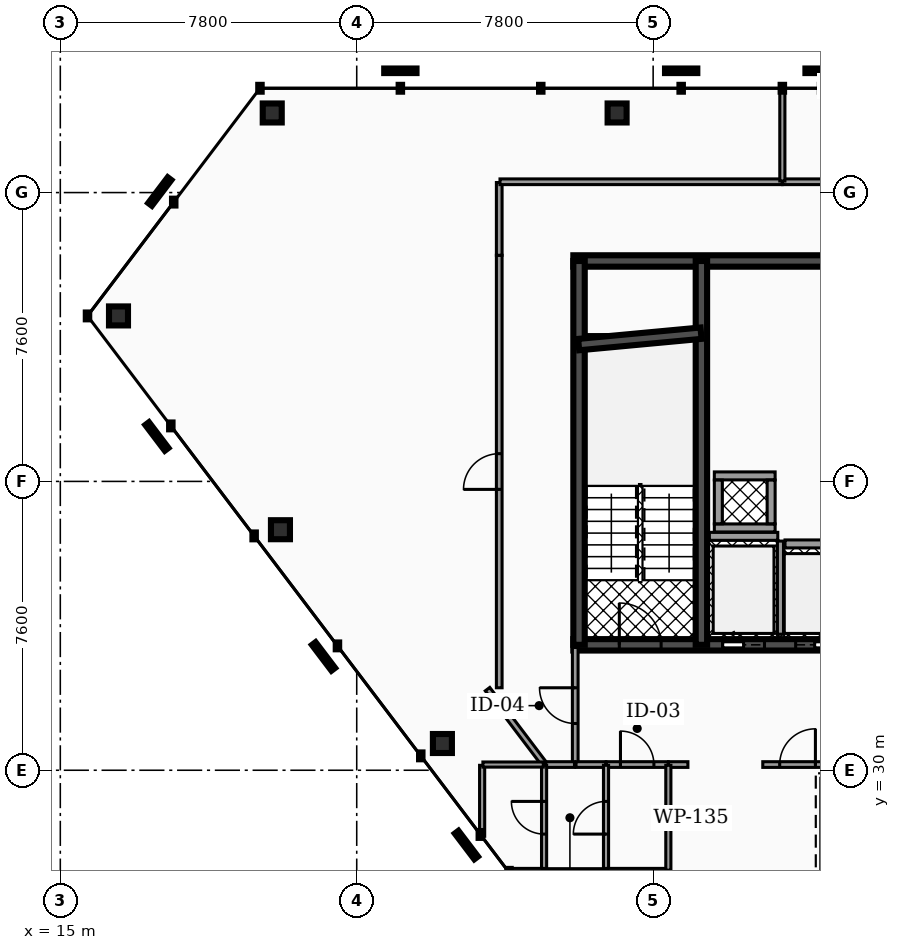
"""IFC4 building model, lengths in metres.
Left out: names, types, materials, properties, quantities, classifications, styles, units other than length and angle.
Written with IfcOpenShell. Run it as: python <this file> out.ifc"""

import sys

from ifc_helpers import new_model, si_unit, direction, frame, frame_2d, origin, origin_2d, place, context, subcontext, project, spatial, rectangle, hollow_rectangle, extrude, element, fill, save


model = new_model("IFC4")
c1 = context("Model", 3, precision=1e-05, world=origin(), true_north=direction((0.0, 1.0)))
c2 = subcontext(c1, "Body", "Model", "MODEL_VIEW")
j1 = project(units=[si_unit("LENGTHUNIT", "METRE"), si_unit("PLANEANGLEUNIT", "RADIAN")], contexts=[c1])
p1 = place(None, origin())
s1 = spatial("IfcSite", under=j1, at=p1, CompositionType="ELEMENT")
p2 = place(p1, origin())
s2 = spatial("IfcBuilding", under=s1, at=p2, CompositionType="ELEMENT")
p3 = place(p2, frame((0.0, 0.0, 249.56)))
s3 = spatial("IfcBuildingStorey", under=s2, at=p3, CompositionType="ELEMENT", Elevation=249.56)
p4 = place(p3, frame((28.5, 43.4, 0.0), z_axis=(0.0, 0.0, 1.0), x_axis=(1.0, 0.0, 0.0)))
e1 = element("IfcWall", 1, at=p4, inside=s3, PredefinedType="SHEAR", context=c2, shape_type="SweptSolid", body=[
    extrude(rectangle(XDim=19.86, YDim=0.3, at=frame_2d((9.93, 0.0))), origin(), (0.0, 0.0, 1.0), 3.05),
])
p5 = place(p3, frame((28.5, 33.3, 0.0), z_axis=(0.0, 0.0, 1.0), x_axis=(1.0, 0.0, 0.0)))
e2 = element("IfcWall", 2, at=p5, inside=s3, PredefinedType="SHEAR", context=c2, shape_type="SweptSolid", body=[
    extrude(rectangle(XDim=19.86, YDim=0.3, at=frame_2d((9.93, 0.0))), origin(), (0.0, 0.0, 1.0), 3.05),
])
p6 = place(p5, frame((3.93, 0.0, 0.0)))
e3 = element("IfcOpeningElement", 3, at=p6, cuts=e2, PredefinedType="OPENING", context=c2, shape_type="SweptSolid", body=[
    extrude(rectangle(XDim=1.1, YDim=2.15, at=frame_2d((0.55, 1.075))), frame((0.0, 0.16, 0.0), z_axis=(0.0, -1.0, 0.0), x_axis=(1.0, 0.0, 0.0)), (0.0, 0.0, 1.0), 0.32),
])
p7 = place(p5, frame((14.77, 0.0, 0.0)))
e4 = element("IfcOpeningElement", 4, at=p7, cuts=e2, PredefinedType="OPENING", context=c2, shape_type="SweptSolid", body=[
    extrude(rectangle(XDim=1.1, YDim=2.15, at=frame_2d((0.55, 1.075))), frame((0.0, 0.16, 0.0), z_axis=(0.0, -1.0, 0.0), x_axis=(1.0, 0.0, 0.0)), (0.0, 0.0, 1.0), 0.32),
])
p8 = place(p5, frame((11.25, 0.0, 0.0)))
e5 = element("IfcOpeningElement", 5, at=p8, cuts=e2, PredefinedType="OPENING", context=c2, shape_type="SweptSolid", body=[
    extrude(rectangle(XDim=1.0, YDim=2.1, at=frame_2d((0.5, 1.05))), frame((0.0, 0.16, 0.0), z_axis=(0.0, -1.0, 0.0), x_axis=(1.0, 0.0, 0.0)), (0.0, 0.0, 1.0), 0.32),
])
p9 = place(p5, frame((12.95, 0.0, 0.0)))
e6 = element("IfcOpeningElement", 6, at=p9, cuts=e2, PredefinedType="OPENING", context=c2, shape_type="SweptSolid", body=[
    extrude(rectangle(XDim=1.0, YDim=2.1, at=frame_2d((0.5, 1.05))), frame((0.0, 0.16, 0.0), z_axis=(0.0, -1.0, 0.0), x_axis=(1.0, 0.0, 0.0)), (0.0, 0.0, 1.0), 0.32),
])
p10 = place(p5, frame((5.85, 0.0, 0.0)))
e7 = element("IfcOpeningElement", 7, at=p10, cuts=e2, PredefinedType="OPENING", context=c2, shape_type="SweptSolid", body=[
    extrude(rectangle(XDim=1.0, YDim=2.1, at=frame_2d((0.5, 1.05))), frame((0.0, 0.16, 0.0), z_axis=(0.0, -1.0, 0.0), x_axis=(1.0, 0.0, 0.0)), (0.0, 0.0, 1.0), 0.32),
])
p11 = place(p5, frame((1.21, 0.0, 0.0)))
e8 = element("IfcOpeningElement", 8, at=p11, cuts=e2, PredefinedType="OPENING", context=c2, shape_type="SweptSolid", body=[
    extrude(rectangle(XDim=1.1, YDim=2.2, at=frame_2d((0.55, 1.1))), frame((0.0, 0.16, 0.0), z_axis=(0.0, -1.0, 0.0), x_axis=(1.0, 0.0, 0.0)), (0.0, 0.0, 1.0), 0.32),
])
p12 = place(p5, frame((9.34, 0.0, 0.0)))
e9 = element("IfcOpeningElement", 9, at=p12, cuts=e2, PredefinedType="OPENING", context=c2, shape_type="SweptSolid", body=[
    extrude(rectangle(XDim=1.12, YDim=2.05, at=frame_2d((0.56, 1.025))), frame((0.0, 0.16, 0.0), z_axis=(0.0, -1.0, 0.0), x_axis=(1.0, 0.0, 0.0)), (0.0, 0.0, 1.0), 0.32),
])
p13 = place(p5, frame((17.55, 0.0, 0.0)))
e10 = element("IfcOpeningElement", 10, at=p13, cuts=e2, PredefinedType="OPENING", context=c2, shape_type="SweptSolid", body=[
    extrude(rectangle(XDim=1.1, YDim=2.2, at=frame_2d((0.55, 1.1))), frame((0.0, 0.16, 0.0), z_axis=(0.0, -1.0, 0.0), x_axis=(1.0, 0.0, 0.0)), (0.0, 0.0, 1.0), 0.32),
])
for number, where, z_axis, x_axis in (
    (11, (28.65, 33.3, 0.0), (0.0, 0.0, 1.0), (0.0, 1.0, 0.0)),
    (12, (31.87, 33.3, 0.0), (0.0, 0.0, 1.0), (0.0, 1.0, 0.0)),
):
    element("IfcWall", number, at=place(p3, frame(where, z_axis=z_axis, x_axis=x_axis)), inside=s3, PredefinedType="SHEAR", context=c2, shape_type="SweptSolid", body=[
        extrude(rectangle(XDim=10.1, YDim=0.3, at=frame_2d((5.05, 0.0))), origin(), (0.0, 0.0, 1.0), 3.05),
    ])
p14 = place(p3, frame((28.64, 41.2, 0.0), z_axis=(0.0, 0.0, 1.0), x_axis=(0.995687118776, 0.092774789157, 0.0)))
e13 = element("IfcWall", 13, at=p14, inside=s3, PredefinedType="SHEAR", context=c2, shape_type="SweptSolid", body=[
    extrude(rectangle(XDim=3.234, YDim=0.3, at=frame_2d((1.617, 0.0))), origin(), (0.0, 0.0, 1.0), 3.05),
])
p15 = place(p3, frame((29.652, 47.294, 0.0), z_axis=(-0.01016434447, -0.01272543914, 0.999867365854), x_axis=(0.781348007617, -0.624095578411, 0.0)))
e14 = element("IfcColumn", 14, at=p15, inside=s3, PredefinedType="COLUMN", context=c2, shape_type="SweptSolid", body=[
    extrude(hollow_rectangle(XDim=0.5, YDim=0.5, WallThickness=0.025, at=origin_2d()), origin(), (0.0, 0.0, 1.0), 3.051),
])
p16 = place(p3, frame((20.577, 47.294, 0.0), z_axis=(-0.017765707888, -0.012724088082, 0.999761210093), x_axis=(0.582276969769, -0.812990486092, 0.0)))
e15 = element("IfcColumn", 15, at=p16, inside=s3, PredefinedType="COLUMN", context=c2, shape_type="SweptSolid", body=[
    extrude(hollow_rectangle(XDim=0.5, YDim=0.5, WallThickness=0.025, at=origin_2d()), origin(), (0.0, 0.0, 1.0), 3.051),
])
p17 = place(p3, frame((16.531, 41.954, 0.0), z_axis=(0.022947476885, 0.041017615478, 0.99889487361), x_axis=(-0.872709005567, 0.488240710717, 0.0)))
e16 = element("IfcColumn", 16, at=p17, inside=s3, PredefinedType="COLUMN", context=c2, shape_type="SweptSolid", body=[
    extrude(hollow_rectangle(XDim=0.5, YDim=0.5, WallThickness=0.025, at=origin_2d()), origin(), (0.0, 0.0, 1.0), 3.053),
])
p18 = place(p3, frame((20.793, 36.329, 0.0), z_axis=(0.02550786922, 0.037662089036, 0.998964922136), x_axis=(-0.827971348636, 0.560770403853, 0.0)))
e17 = element("IfcColumn", 17, at=p18, inside=s3, PredefinedType="COLUMN", context=c2, shape_type="SweptSolid", body=[
    extrude(hollow_rectangle(XDim=0.5, YDim=0.5, WallThickness=0.025, at=origin_2d()), origin(), (0.0, 0.0, 1.0), 3.053),
])
p19 = place(p3, frame((25.055, 30.704, 0.0), z_axis=(0.028068274042, 0.034145735089, 0.99902264277), x_axis=(-0.772504370212, 0.635009447177, 0.0)))
e18 = element("IfcColumn", 18, at=p19, inside=s3, PredefinedType="COLUMN", context=c2, shape_type="SweptSolid", body=[
    extrude(hollow_rectangle(XDim=0.5, YDim=0.5, WallThickness=0.025, at=origin_2d()), origin(), (0.0, 0.0, 1.0), 3.053),
])
p20 = place(p3, frame((32.08, 36.155, 0.0), z_axis=(0.0, 0.0, 1.0), x_axis=(1.0, 0.0, 0.0)))
e19 = element("IfcWall", 19, at=p20, inside=s3, PredefinedType="SOLIDWALL", context=c2, shape_type="SweptSolid", body=[
    extrude(rectangle(XDim=1.8, YDim=0.21, at=frame_2d((0.9, 0.0))), origin(), (0.0, 0.0, 1.0), 3.05),
])
p21 = place(p3, frame((33.95, 33.58, 0.0), z_axis=(0.0, 0.0, 1.0), x_axis=(0.0, 1.0, 0.0)))
e20 = element("IfcWall", 20, at=p21, inside=s3, PredefinedType="SOLIDWALL", context=c2, shape_type="SweptSolid", body=[
    extrude(rectangle(XDim=2.45, YDim=0.16, at=frame_2d((1.225, 0.0))), origin(), (0.0, 0.0, 1.0), 3.05),
])
p22 = place(p3, frame((34.07, 35.955, 0.0), z_axis=(0.0, 0.0, 1.0), x_axis=(1.0, 0.0, 0.0)))
e21 = element("IfcWall", 21, at=p22, inside=s3, PredefinedType="SOLIDWALL", context=c2, shape_type="SweptSolid", body=[
    extrude(rectangle(XDim=1.56, YDim=0.21, at=frame_2d((0.78, 0.0))), origin(), (0.0, 0.0, 1.0), 3.05),
])
for number, where, z_axis, x_axis in (
    (22, (32.21, 36.375, 0.0), (0.0, 0.0, 1.0), (1.0, 0.0, 0.0)),
    (23, (32.21, 37.745, 0.0), (0.0, 0.0, 1.0), (1.0, 0.0, 0.0)),
):
    element("IfcWall", number, at=place(p3, frame(where, z_axis=z_axis, x_axis=x_axis)), inside=s3, PredefinedType="SOLIDWALL", context=c2, shape_type="SweptSolid", body=[
        extrude(rectangle(XDim=1.6, YDim=0.21, at=frame_2d((0.8, 0.0))), origin(), (0.0, 0.0, 1.0), 3.05),
    ])
for number, where, z_axis, x_axis in (
    (24, (32.315, 36.485, 0.0), (0.0, 0.0, 1.0), (0.0, 1.0, 0.0)),
    (25, (33.705, 36.485, 0.0), (0.0, 0.0, 1.0), (0.0, 1.0, 0.0)),
):
    element("IfcWall", number, at=place(p3, frame(where, z_axis=z_axis, x_axis=x_axis)), inside=s3, PredefinedType="SOLIDWALL", context=c2, shape_type="SweptSolid", body=[
        extrude(rectangle(XDim=1.15, YDim=0.21, at=frame_2d((0.575, 0.0))), origin(), (0.0, 0.0, 1.0), 3.05),
    ])
p23 = place(p3, frame((28.55, 30.17, 0.0), z_axis=(0.0, 0.0, 1.0), x_axis=(0.0, 1.0, 0.0)))
e26 = element("IfcWall", 26, at=p23, inside=s3, PredefinedType="PARTITIONING", context=c2, shape_type="SweptSolid", body=[
    extrude(rectangle(XDim=3.06, YDim=0.15, at=frame_2d((1.53, 0.0))), origin(), (0.0, 0.0, 1.0), 2.2),
])
p24 = place(p23, frame((1.06, 0.0, 0.0)))
e27 = element("IfcOpeningElement", 27, at=p24, cuts=e26, PredefinedType="OPENING", context=c2, shape_type="SweptSolid", body=[
    extrude(rectangle(XDim=0.94, YDim=2.05, at=frame_2d((0.47, 1.025))), frame((0.0, 0.085, 0.0), z_axis=(0.0, -1.0, 0.0), x_axis=(1.0, 0.0, 0.0)), (0.0, 0.0, 1.0), 0.17),
])
p25 = place(p3, frame((29.365, 30.15, 0.0), z_axis=(0.0, 0.0, 1.0), x_axis=(1.0, 0.0, 0.0)))
e28 = element("IfcWall", 28, at=p25, inside=s3, PredefinedType="PARTITIONING", context=c2, shape_type="SweptSolid", body=[
    extrude(rectangle(XDim=1.63, YDim=0.15, at=frame_2d((0.815, 0.0))), origin(), (0.0, 0.0, 1.0), 2.2),
])
p26 = place(p25, frame((0.375, 0.0, 0.0)))
e29 = element("IfcOpeningElement", 29, at=p26, cuts=e28, PredefinedType="OPENING", context=c2, shape_type="SweptSolid", body=[
    extrude(rectangle(XDim=0.88, YDim=2.05, at=frame_2d((0.44, 1.025))), frame((0.0, 0.085, 0.0), z_axis=(0.0, -1.0, 0.0), x_axis=(1.0, 0.0, 0.0)), (0.0, 0.0, 1.0), 0.17),
])
p27 = place(p3, frame((28.57, 30.15, 0.0), z_axis=(0.0, 0.0, 1.0), x_axis=(1.0, 0.0, 0.0)))
e30 = element("IfcWall", 30, at=p27, inside=s3, PredefinedType="PARTITIONING", context=c2, shape_type="SweptSolid", body=[
    extrude(rectangle(XDim=0.785, YDim=0.15, at=frame_2d((0.393, 0.0))), origin(), (0.0, 0.0, 1.0), 2.2),
])
p28 = place(p3, frame((33.485, 30.15, 0.0), z_axis=(0.0, 0.0, 1.0), x_axis=(1.0, 0.0, 0.0)))
e31 = element("IfcWall", 31, at=p28, inside=s3, PredefinedType="PARTITIONING", context=c2, shape_type="SweptSolid", body=[
    extrude(rectangle(XDim=9.83, YDim=0.15, at=frame_2d((4.915, 0.0))), origin(), (0.0, 0.0, 1.0), 2.2),
])
p29 = place(p28, frame((0.445, 0.0, 0.0)))
e32 = element("IfcOpeningElement", 32, at=p29, cuts=e31, PredefinedType="OPENING", context=c2, shape_type="SweptSolid", body=[
    extrude(rectangle(XDim=0.94, YDim=2.05, at=frame_2d((0.47, 1.025))), frame((0.0, 0.085, 0.0), z_axis=(0.0, -1.0, 0.0), x_axis=(1.0, 0.0, 0.0)), (0.0, 0.0, 1.0), 0.17),
])
p30 = place(p3, frame((31.005, 30.15, 0.0), z_axis=(0.0, 0.0, 1.0), x_axis=(1.0, 0.0, 0.0)))
e33 = element("IfcWall", 33, at=p30, inside=s3, PredefinedType="PARTITIONING", context=c2, shape_type="SweptSolid", body=[
    extrude(rectangle(XDim=0.51, YDim=0.15, at=frame_2d((0.255, 0.0))), origin(), (0.0, 0.0, 1.0), 2.2),
])
p31 = place(p3, frame((27.765, 30.15, 0.0), z_axis=(0.0, 0.0, 1.0), x_axis=(1.0, 0.0, 0.0)))
e34 = element("IfcWall", 34, at=p31, inside=s3, PredefinedType="PARTITIONING", context=c2, shape_type="SweptSolid", body=[
    extrude(rectangle(XDim=0.765, YDim=0.15, at=frame_2d((0.383, 0.0))), origin(), (0.0, 0.0, 1.0), 2.2),
])
p32 = place(p3, frame((26.242, 32.134, 0.0), z_axis=(0.0, 0.0, 1.0), x_axis=(0.603806281462, -0.797131089889, 0.0)))
e35 = element("IfcWall", 35, at=p32, inside=s3, PredefinedType="PARTITIONING", context=c2, shape_type="SweptSolid", body=[
    extrude(rectangle(XDim=2.469, YDim=0.15, at=frame_2d((1.234, 0.0))), origin(), (0.0, 0.0, 1.0), 2.2),
])
p33 = place(p3, frame((26.55, 32.17, 0.0), z_axis=(0.0, 0.0, 1.0), x_axis=(0.0, 1.0, 0.0)))
e36 = element("IfcWall", 36, at=p33, inside=s3, PredefinedType="PARTITIONING", context=c2, shape_type="SweptSolid", body=[
    extrude(rectangle(XDim=11.38, YDim=0.15, at=frame_2d((5.69, 0.0))), origin(), (0.0, 0.0, 1.0), 2.2),
])
p34 = place(p33, frame((5.22, 0.0, 0.0)))
e37 = element("IfcOpeningElement", 37, at=p34, cuts=e36, PredefinedType="OPENING", context=c2, shape_type="SweptSolid", body=[
    extrude(rectangle(XDim=0.94, YDim=2.05, at=frame_2d((0.47, 1.025))), frame((0.0, 0.085, 0.0), z_axis=(0.0, -1.0, 0.0), x_axis=(1.0, 0.0, 0.0)), (0.0, 0.0, 1.0), 0.17),
])
p35 = place(p3, frame((26.55, 43.55, 0.0), z_axis=(0.0, 0.0, 1.0), x_axis=(0.0, 1.0, 0.0)))
e38 = element("IfcWall", 38, at=p35, inside=s3, PredefinedType="PARTITIONING", context=c2, shape_type="SweptSolid", body=[
    extrude(rectangle(XDim=1.915, YDim=0.15, at=frame_2d((0.957, 0.0))), origin(), (0.0, 0.0, 1.0), 2.2),
])
p36 = place(p3, frame((26.57, 45.485, 0.0), z_axis=(0.0, 0.0, 1.0), x_axis=(1.0, 0.0, 0.0)))
e39 = element("IfcWall", 39, at=p36, inside=s3, PredefinedType="PARTITIONING", context=c2, shape_type="SweptSolid", body=[
    extrude(rectangle(XDim=7.425, YDim=0.15, at=frame_2d((3.712, 0.0))), origin(), (0.0, 0.0, 1.0), 2.2),
])
p37 = place(p3, frame((34.005, 45.485, 0.0), z_axis=(0.0, 0.0, 1.0), x_axis=(1.0, 0.0, 0.0)))
e40 = element("IfcWall", 40, at=p37, inside=s3, PredefinedType="PARTITIONING", context=c2, shape_type="SweptSolid", body=[
    extrude(rectangle(XDim=2.54, YDim=0.15, at=frame_2d((1.27, 0.0))), origin(), (0.0, 0.0, 1.0), 2.2),
])
p38 = place(p3, frame((29.36, 27.37, 0.0), z_axis=(0.0, 0.0, 1.0), x_axis=(0.0, 1.0, 0.0)))
e41 = element("IfcWall", 41, at=p38, inside=s3, PredefinedType="PARTITIONING", context=c2, shape_type="SweptSolid", body=[
    extrude(rectangle(XDim=2.76, YDim=0.135, at=frame_2d((1.38, 0.0))), origin(), (0.0, 0.0, 1.0), 2.2),
])
p39 = place(p38, frame((0.95, 0.0, 0.0)))
e42 = element("IfcOpeningElement", 42, at=p39, cuts=e41, PredefinedType="OPENING", context=c2, shape_type="SweptSolid", body=[
    extrude(rectangle(XDim=0.86, YDim=2.05, at=frame_2d((0.43, 1.025))), frame((0.0, 0.077, 0.0), z_axis=(0.0, -1.0, 0.0), x_axis=(1.0, 0.0, 0.0)), (0.0, 0.0, 1.0), 0.155),
])
p40 = place(p3, frame((29.38, 27.35, 0.0), z_axis=(0.0, 0.0, 1.0), x_axis=(1.0, 0.0, 0.0)))
e43 = element("IfcWall", 43, at=p40, inside=s3, PredefinedType="PARTITIONING", context=c2, shape_type="SweptSolid", body=[
    extrude(rectangle(XDim=1.6, YDim=0.135, at=frame_2d((0.8, 0.0))), origin(), (0.0, 0.0, 1.0), 2.2),
])
p41 = place(p3, frame((31.0, 27.37, 0.0), z_axis=(0.0, 0.0, 1.0), x_axis=(0.0, 1.0, 0.0)))
e44 = element("IfcWall", 44, at=p41, inside=s3, PredefinedType="PARTITIONING", context=c2, shape_type="SweptSolid", body=[
    extrude(rectangle(XDim=2.76, YDim=0.135, at=frame_2d((1.38, 0.0))), origin(), (0.0, 0.0, 1.0), 2.2),
])
p42 = place(p3, frame((27.73, 27.37, 0.0), z_axis=(0.0, 0.0, 1.0), x_axis=(0.0, 1.0, 0.0)))
e45 = element("IfcWall", 45, at=p42, inside=s3, PredefinedType="PARTITIONING", context=c2, shape_type="SweptSolid", body=[
    extrude(rectangle(XDim=2.76, YDim=0.135, at=frame_2d((1.38, 0.0))), origin(), (0.0, 0.0, 1.0), 2.2),
])
p43 = place(p42, frame((0.95, 0.0, 0.0)))
e46 = element("IfcOpeningElement", 46, at=p43, cuts=e45, PredefinedType="OPENING", context=c2, shape_type="SweptSolid", body=[
    extrude(rectangle(XDim=0.86, YDim=2.05, at=frame_2d((0.43, 1.025))), frame((0.0, 0.077, 0.0), z_axis=(0.0, -1.0, 0.0), x_axis=(1.0, 0.0, 0.0)), (0.0, 0.0, 1.0), 0.155),
])
p44 = place(p3, frame((26.795, 27.35, 0.0), z_axis=(0.0, 0.0, 1.0), x_axis=(1.0, 0.0, 0.0)))
e47 = element("IfcWall", 47, at=p44, inside=s3, PredefinedType="PARTITIONING", context=c2, shape_type="SweptSolid", body=[
    extrude(rectangle(XDim=0.915, YDim=0.135, at=frame_2d((0.458, 0.0))), origin(), (0.0, 0.0, 1.0), 2.2),
])
p45 = place(p3, frame((26.1, 28.262, 0.0), z_axis=(0.0, 0.0, 1.0), x_axis=(0.0, 1.0, 0.0)))
e48 = element("IfcWall", 48, at=p45, inside=s3, PredefinedType="PARTITIONING", context=c2, shape_type="SweptSolid", body=[
    extrude(rectangle(XDim=1.868, YDim=0.135, at=frame_2d((0.934, 0.0))), origin(), (0.0, 0.0, 1.0), 2.2),
])
p46 = place(p3, frame((26.12, 30.15, 0.0), z_axis=(0.0, 0.0, 1.0), x_axis=(1.0, 0.0, 0.0)))
e49 = element("IfcWall", 49, at=p46, inside=s3, PredefinedType="PARTITIONING", context=c2, shape_type="SweptSolid", body=[
    extrude(rectangle(XDim=1.59, YDim=0.135, at=frame_2d((0.795, 0.0))), origin(), (0.0, 0.0, 1.0), 2.2),
])
p47 = place(p3, frame((27.75, 27.35, 0.0), z_axis=(0.0, 0.0, 1.0), x_axis=(1.0, 0.0, 0.0)))
e50 = element("IfcWall", 50, at=p47, inside=s3, PredefinedType="PARTITIONING", context=c2, shape_type="SweptSolid", body=[
    extrude(rectangle(XDim=1.59, YDim=0.12, at=frame_2d((0.795, 0.0))), origin(), (0.0, 0.0, 1.0), 2.2),
])
p48 = place(p3, frame((34.0, 45.504, 0.0), z_axis=(0.0, 0.0, 1.0), x_axis=(0.0, 1.0, 0.0)))
e51 = element("IfcWall", 51, at=p48, inside=s3, PredefinedType="PARTITIONING", context=c2, shape_type="SweptSolid", body=[
    extrude(rectangle(XDim=2.425, YDim=0.135, at=frame_2d((1.212, 0.0))), origin(), (0.0, 0.0, 1.0), 2.2),
])
p49 = place(p6, origin())
e52 = element("IfcDoor", 52, at=p49, inside=s3, OperationType="SLIDING_TO_LEFT", PredefinedType="DOOR", context=c2, shape_type="SweptSolid", body=[
    extrude(rectangle(XDim=1.1, YDim=2.15, at=frame_2d((0.55, 1.075))), frame((0.0, 0.025, 0.0), z_axis=(0.0, -1.0, 0.0), x_axis=(1.0, 0.0, 0.0)), (0.0, 0.0, 1.0), 0.05),
])
fill(e3, e52)
p50 = place(p10, origin())
e53 = element("IfcDoor", 53, at=p50, inside=s3, OperationType="SLIDING_TO_RIGHT", PredefinedType="DOOR", context=c2, shape_type="SweptSolid", body=[
    extrude(rectangle(XDim=1.0, YDim=2.1, at=frame_2d((0.5, 1.05))), frame((0.0, 0.025, 0.0), z_axis=(0.0, -1.0, 0.0), x_axis=(1.0, 0.0, 0.0)), (0.0, 0.0, 1.0), 0.05),
])
fill(e7, e53)
p51 = place(p11, origin())
e54 = element("IfcDoor", 54, at=p51, inside=s3, OperationType="SINGLE_SWING_LEFT", PredefinedType="DOOR", context=c2, shape_type="SweptSolid", body=[
    extrude(rectangle(XDim=1.1, YDim=2.2, at=frame_2d((0.55, 1.1))), frame((0.0, 0.025, 0.0), z_axis=(0.0, -1.0, 0.0), x_axis=(1.0, 0.0, 0.0)), (0.0, 0.0, 1.0), 0.05),
])
fill(e8, e54)
p52 = place(p24, origin())
e55 = element("IfcDoor", 55, at=p52, inside=s3, OperationType="SINGLE_SWING_RIGHT", PredefinedType="DOOR", context=c2, shape_type="SweptSolid", body=[
    extrude(rectangle(XDim=0.94, YDim=2.05, at=frame_2d((0.47, 1.025))), frame((0.0, 0.025, 0.0), z_axis=(0.0, -1.0, 0.0), x_axis=(1.0, 0.0, 0.0)), (0.0, 0.0, 1.0), 0.05),
])
fill(e27, e55)
p53 = place(p26, origin())
e56 = element("IfcDoor", 56, at=p53, inside=s3, OperationType="SINGLE_SWING_LEFT", PredefinedType="DOOR", context=c2, shape_type="SweptSolid", body=[
    extrude(rectangle(XDim=0.88, YDim=2.05, at=frame_2d((0.44, 1.025))), frame((0.0, 0.025, 0.0), z_axis=(0.0, -1.0, 0.0), x_axis=(1.0, 0.0, 0.0)), (0.0, 0.0, 1.0), 0.05),
])
fill(e29, e56)
p54 = place(p29, origin())
e57 = element("IfcDoor", 57, at=p54, inside=s3, OperationType="SINGLE_SWING_RIGHT", PredefinedType="DOOR", context=c2, shape_type="SweptSolid", body=[
    extrude(rectangle(XDim=0.94, YDim=2.05, at=frame_2d((0.47, 1.025))), frame((0.0, 0.025, 0.0), z_axis=(0.0, -1.0, 0.0), x_axis=(1.0, 0.0, 0.0)), (0.0, 0.0, 1.0), 0.05),
])
fill(e32, e57)
p55 = place(p34, origin())
e58 = element("IfcDoor", 58, at=p55, inside=s3, OperationType="SINGLE_SWING_LEFT", PredefinedType="DOOR", context=c2, shape_type="SweptSolid", body=[
    extrude(rectangle(XDim=0.94, YDim=2.05, at=frame_2d((0.47, 1.025))), frame((0.0, 0.025, 0.0), z_axis=(0.0, -1.0, 0.0), x_axis=(1.0, 0.0, 0.0)), (0.0, 0.0, 1.0), 0.05),
])
fill(e37, e58)
p56 = place(p39, origin())
e59 = element("IfcDoor", 59, at=p56, inside=s3, OperationType="SINGLE_SWING_LEFT", PredefinedType="DOOR", context=c2, shape_type="SweptSolid", body=[
    extrude(rectangle(XDim=0.86, YDim=2.05, at=frame_2d((0.43, 1.025))), frame((0.0, 0.025, 0.0), z_axis=(0.0, -1.0, 0.0), x_axis=(1.0, 0.0, 0.0)), (0.0, 0.0, 1.0), 0.05),
])
fill(e42, e59)
p57 = place(p43, origin())
e60 = element("IfcDoor", 60, at=p57, inside=s3, OperationType="SINGLE_SWING_RIGHT", PredefinedType="DOOR", context=c2, shape_type="SweptSolid", body=[
    extrude(rectangle(XDim=0.86, YDim=2.05, at=frame_2d((0.43, 1.025))), frame((0.0, 0.025, 0.0), z_axis=(0.0, -1.0, 0.0), x_axis=(1.0, 0.0, 0.0)), (0.0, 0.0, 1.0), 0.05),
])
fill(e46, e60)
save(model, sys.argv[1])
